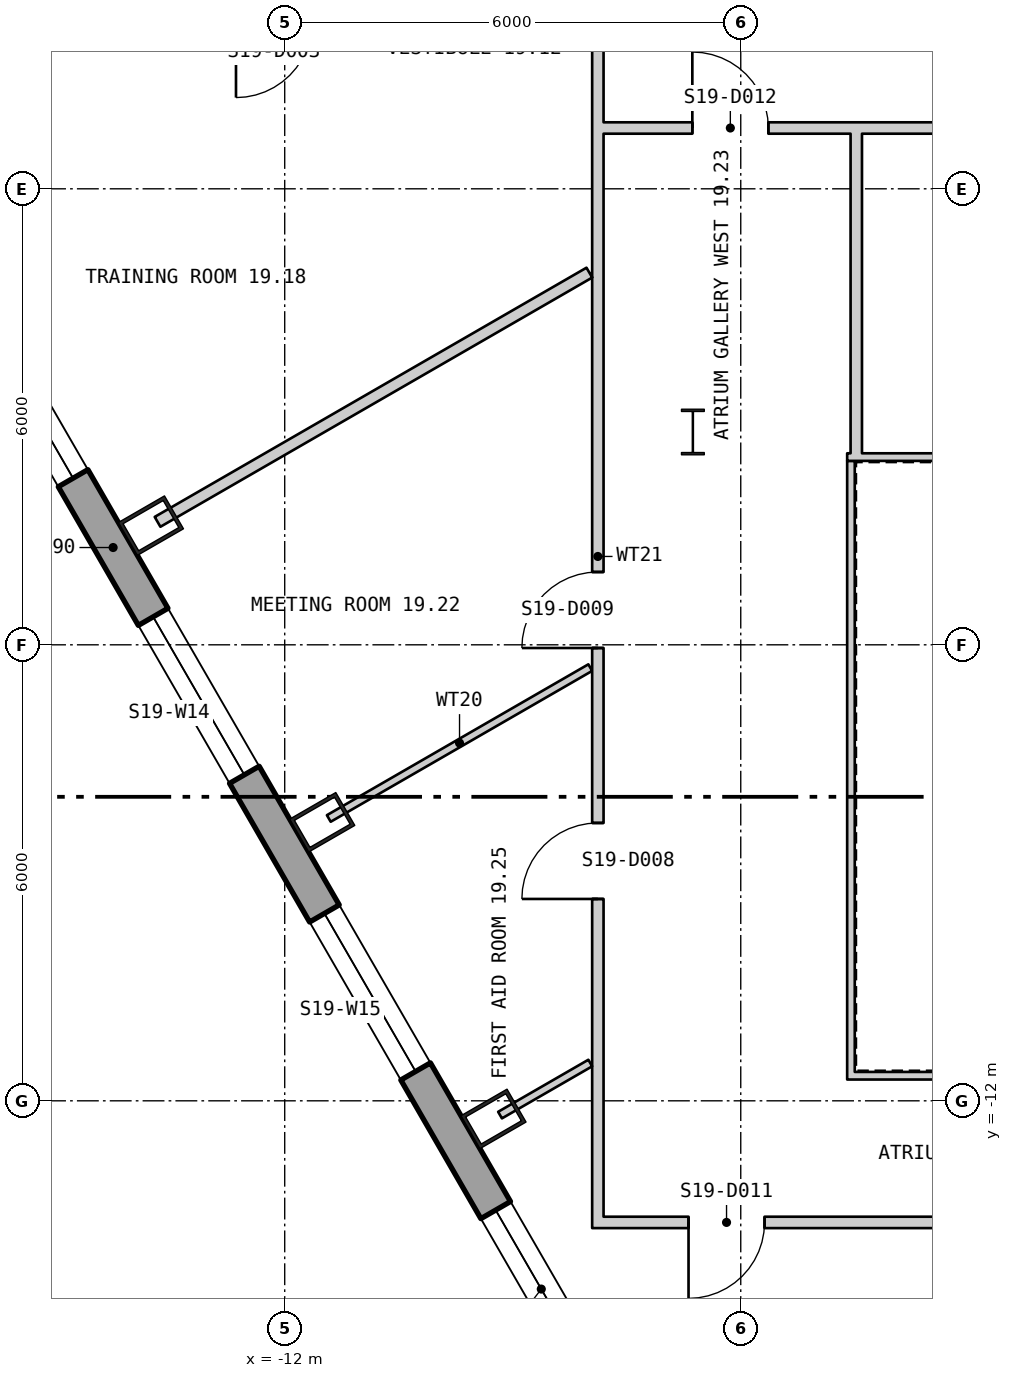
"""IFC4 building model, lengths in metres.
Left out: names, types, materials, properties, quantities, classifications, styles, units other than length and angle.
Written with IfcOpenShell. Run it as: python <this file> out.ifc"""

import sys

from ifc_helpers import new_model, si_unit, direction, frame, frame_2d, origin, origin_2d, place, context, subcontext, project, spatial, polyline, rectangle, hollow_rectangle, i_section, outline, extrude, element, fill, save


model = new_model("IFC4")
c1 = context("Model", 3, precision=1e-05, world=origin(), true_north=direction((0.0, 1.0)))
c2 = subcontext(c1, "Body", "Model", "MODEL_VIEW")
j1 = project(units=[si_unit("LENGTHUNIT", "METRE"), si_unit("PLANEANGLEUNIT", "RADIAN")], contexts=[c1])
p1 = place(None, origin())
s1 = spatial("IfcSite", under=j1, at=p1, CompositionType="ELEMENT")
p2 = place(p1, origin())
s2 = spatial("IfcBuilding", under=s1, at=p2, CompositionType="ELEMENT")
p3 = place(p2, frame((0.0, 0.0, 257.1)))
s3 = spatial("IfcBuildingStorey", under=s2, at=p3, CompositionType="ELEMENT", Elevation=257.1)
for number, where, z_axis, x_axis in (
    (1, (-13.76, -4.432, 0.0), (0.0, 0.0, 1.0), (0.5, -0.866, 0.0)),
    (2, (-11.506, -8.335, 0.0), (0.0, 0.0, 1.0), (0.5, -0.866, 0.0)),
    (3, (-9.253, -12.238, 0.0), (0.0, 0.0, 1.0), (0.5, -0.866, 0.0)),
):
    element("IfcColumn", number, at=place(p3, frame(where, z_axis=z_axis, x_axis=x_axis)), inside=s3, PredefinedType="COLUMN", context=c2, shape_type="SweptSolid", body=[
        extrude(hollow_rectangle(XDim=0.5, YDim=0.7, WallThickness=0.045, at=origin_2d()), origin(), (0.0, 0.0, 1.0), 3.9),
    ])
p4 = place(p3, frame((-6.63, -3.2, 0.0), z_axis=(0.0, 0.0, 1.0), x_axis=(1.0, 0.0, 0.0)))
e4 = element("IfcColumn", 4, at=p4, inside=s3, PredefinedType="COLUMN", context=c2, shape_type="SweptSolid", body=[
    extrude(i_section(OverallWidth=0.3, OverallDepth=0.6, WebThickness=0.015, FlangeThickness=0.03, at=origin_2d()), origin(), (0.0, 0.0, 1.0), 3.9),
])
p5 = place(p3, frame((-25.69, 15.082, -0.18), z_axis=(0.0, 0.0, 1.0), x_axis=(0.500000141277, -0.866025322218, 0.0)))
e5 = element("IfcWall", 5, at=p5, inside=s3, PredefinedType="SOLIDWALL", context=c2, shape_type="SweptSolid", body=[
    extrude(outline(polyline([(-0.13, -0.225), (45.86, -0.225), (45.6, 0.225), (0.13, 0.225), (-0.13, -0.225)])), origin(), (0.0, 0.0, 1.0), 3.68),
])
p6 = place(p5, frame((1.424, 0.0, 1.08)))
e6 = element("IfcOpeningElement", 6, at=p6, cuts=e5, PredefinedType="OPENING", context=c2, shape_type="SweptSolid", body=[
    extrude(rectangle(XDim=2.4, YDim=2.0, at=frame_2d((1.2, 1.0))), frame((0.0, 0.235, 0.0), z_axis=(0.0, -1.0, 0.0), x_axis=(1.0, 0.0, 0.0)), (0.0, 0.0, 1.0), 0.47),
])
p7 = place(p5, frame((5.892, 0.0, 1.08)))
e7 = element("IfcOpeningElement", 7, at=p7, cuts=e5, PredefinedType="OPENING", context=c2, shape_type="SweptSolid", body=[
    extrude(rectangle(XDim=2.4, YDim=2.0, at=frame_2d((1.2, 1.0))), frame((0.0, 0.235, 0.0), z_axis=(0.0, -1.0, 0.0), x_axis=(1.0, 0.0, 0.0)), (0.0, 0.0, 1.0), 0.47),
])
p8 = place(p5, frame((10.399, 0.0, 1.08)))
e8 = element("IfcOpeningElement", 8, at=p8, cuts=e5, PredefinedType="OPENING", context=c2, shape_type="SweptSolid", body=[
    extrude(rectangle(XDim=2.4, YDim=2.0, at=frame_2d((1.2, 1.0))), frame((0.0, 0.235, 0.0), z_axis=(0.0, -1.0, 0.0), x_axis=(1.0, 0.0, 0.0)), (0.0, 0.0, 1.0), 0.47),
])
p9 = place(p5, frame((14.905, 0.0, 1.08)))
e9 = element("IfcOpeningElement", 9, at=p9, cuts=e5, PredefinedType="OPENING", context=c2, shape_type="SweptSolid", body=[
    extrude(rectangle(XDim=2.4, YDim=2.0, at=frame_2d((1.2, 1.0))), frame((0.0, 0.235, 0.0), z_axis=(0.0, -1.0, 0.0), x_axis=(1.0, 0.0, 0.0)), (0.0, 0.0, 1.0), 0.47),
])
p10 = place(p5, frame((19.412, 0.0, 1.08)))
e10 = element("IfcOpeningElement", 10, at=p10, cuts=e5, PredefinedType="OPENING", context=c2, shape_type="SweptSolid", body=[
    extrude(rectangle(XDim=2.4, YDim=2.0, at=frame_2d((1.2, 1.0))), frame((0.0, 0.235, 0.0), z_axis=(0.0, -1.0, 0.0), x_axis=(1.0, 0.0, 0.0)), (0.0, 0.0, 1.0), 0.47),
])
p11 = place(p5, frame((23.918, 0.0, 1.08)))
e11 = element("IfcOpeningElement", 11, at=p11, cuts=e5, PredefinedType="OPENING", context=c2, shape_type="SweptSolid", body=[
    extrude(rectangle(XDim=2.4, YDim=2.0, at=frame_2d((1.2, 1.0))), frame((0.0, 0.235, 0.0), z_axis=(0.0, -1.0, 0.0), x_axis=(1.0, 0.0, 0.0)), (0.0, 0.0, 1.0), 0.47),
])
p12 = place(p5, frame((28.425, 0.0, 1.08)))
e12 = element("IfcOpeningElement", 12, at=p12, cuts=e5, PredefinedType="OPENING", context=c2, shape_type="SweptSolid", body=[
    extrude(rectangle(XDim=2.4, YDim=2.0, at=frame_2d((1.2, 1.0))), frame((0.0, 0.235, 0.0), z_axis=(0.0, -1.0, 0.0), x_axis=(1.0, 0.0, 0.0)), (0.0, 0.0, 1.0), 0.47),
])
p13 = place(p5, frame((32.932, 0.0, 1.08)))
e13 = element("IfcOpeningElement", 13, at=p13, cuts=e5, PredefinedType="OPENING", context=c2, shape_type="SweptSolid", body=[
    extrude(rectangle(XDim=2.4, YDim=2.0, at=frame_2d((1.2, 1.0))), frame((0.0, 0.235, 0.0), z_axis=(0.0, -1.0, 0.0), x_axis=(1.0, 0.0, 0.0)), (0.0, 0.0, 1.0), 0.47),
])
p14 = place(p5, frame((37.438, 0.0, 1.08)))
e14 = element("IfcOpeningElement", 14, at=p14, cuts=e5, PredefinedType="OPENING", context=c2, shape_type="SweptSolid", body=[
    extrude(rectangle(XDim=2.4, YDim=2.0, at=frame_2d((1.2, 1.0))), frame((0.0, 0.235, 0.0), z_axis=(0.0, -1.0, 0.0), x_axis=(1.0, 0.0, 0.0)), (0.0, 0.0, 1.0), 0.47),
])
p15 = place(p5, frame((41.907, 0.0, 1.08)))
e15 = element("IfcOpeningElement", 15, at=p15, cuts=e5, PredefinedType="OPENING", context=c2, shape_type="SweptSolid", body=[
    extrude(rectangle(XDim=2.4, YDim=2.0, at=frame_2d((1.2, 1.0))), frame((0.0, 0.235, 0.0), z_axis=(0.0, -1.0, 0.0), x_axis=(1.0, 0.0, 0.0)), (0.0, 0.0, 1.0), 0.47),
])
for number, where, z_axis, x_axis in (
    (16, (-4.6, -11.67, 0.0), (0.0, 0.0, 1.0), (1.0, 0.0, 0.0)),
    (17, (4.6, -3.53, 0.0), (0.0, 0.0, 1.0), (-1.0, 0.0, 0.0)),
):
    element("IfcWall", number, at=place(p3, frame(where, z_axis=z_axis, x_axis=x_axis)), inside=s3, PredefinedType="PARTITIONING", context=c2, shape_type="SweptSolid", body=[
        extrude(rectangle(XDim=9.2, YDim=0.1, at=frame_2d((4.6, 0.0))), origin(), (0.0, 0.0, 1.0), 3.7),
    ])
p16 = place(p3, frame((-4.55, -3.58, 0.0), z_axis=(0.0, 0.0, 1.0), x_axis=(0.0, -1.0, 0.0)))
e18 = element("IfcWall", 18, at=p16, inside=s3, PredefinedType="PARTITIONING", context=c2, shape_type="SweptSolid", body=[
    extrude(rectangle(XDim=8.04, YDim=0.1, at=frame_2d((4.02, 0.0))), origin(), (0.0, 0.0, 1.0), 3.7),
])
p17 = place(p3, frame((-13.673, -4.382, 0.0), z_axis=(0.0, 0.0, 1.0), x_axis=(0.866086584464, 0.499894016979, 0.0)))
e19 = element("IfcWall", 19, at=p17, inside=s3, PredefinedType="PARTITIONING", context=c2, shape_type="SweptSolid", body=[
    extrude(rectangle(XDim=6.559, YDim=0.15, at=frame_2d((3.28, 0.0))), origin(), (0.0, 0.0, 1.0), 3.7),
])
p18 = place(p3, frame((-11.42, -8.285, 0.0), z_axis=(0.0, 0.0, 1.0), x_axis=(0.866143665252, 0.499795109164, 0.0)))
e20 = element("IfcWall", 20, at=p18, inside=s3, PredefinedType="PARTITIONING", context=c2, shape_type="SweptSolid", body=[
    extrude(rectangle(XDim=3.972, YDim=0.1, at=frame_2d((1.986, 0.0))), origin(), (0.0, 0.0, 1.0), 3.7),
])
p19 = place(p3, frame((-9.167, -12.188, 0.0), z_axis=(0.0, 0.0, 1.0), x_axis=(0.866124840845, 0.499827730395, 0.0)))
e21 = element("IfcWall", 21, at=p19, inside=s3, PredefinedType="PARTITIONING", context=c2, shape_type="SweptSolid", body=[
    extrude(rectangle(XDim=1.371, YDim=0.1, at=frame_2d((0.685, 0.0))), origin(), (0.0, 0.0, 1.0), 3.7),
])
p20 = place(p3, frame((-7.88, -13.675, 0.0), z_axis=(0.0, 0.0, 1.0), x_axis=(0.0, 1.0, 0.0)))
e22 = element("IfcWall", 22, at=p20, inside=s3, PredefinedType="PARTITIONING", context=c2, shape_type="SweptSolid", body=[
    extrude(rectangle(XDim=17.675, YDim=0.15, at=frame_2d((8.838, 0.0))), origin(), (0.0, 0.0, 1.0), 3.7),
])
p21 = place(p20, frame((4.331, 0.0, 0.0)))
e23 = element("IfcOpeningElement", 23, at=p21, cuts=e22, PredefinedType="OPENING", context=c2, shape_type="SweptSolid", body=[
    extrude(rectangle(XDim=1.0, YDim=2.1, at=frame_2d((0.5, 1.05))), frame((0.0, 0.085, 0.0), z_axis=(0.0, -1.0, 0.0), x_axis=(1.0, 0.0, 0.0)), (0.0, 0.0, 1.0), 0.17),
])
p22 = place(p20, frame((7.633, 0.0, 0.0)))
e24 = element("IfcOpeningElement", 24, at=p22, cuts=e22, PredefinedType="OPENING", context=c2, shape_type="SweptSolid", body=[
    extrude(rectangle(XDim=1.0, YDim=2.1, at=frame_2d((0.5, 1.05))), frame((0.0, 0.085, 0.0), z_axis=(0.0, -1.0, 0.0), x_axis=(1.0, 0.0, 0.0)), (0.0, 0.0, 1.0), 0.17),
])
p23 = place(p20, frame((16.275, 0.0, 0.0)))
e25 = element("IfcOpeningElement", 25, at=p23, cuts=e22, PredefinedType="OPENING", context=c2, shape_type="SweptSolid", body=[
    extrude(rectangle(XDim=1.0, YDim=2.1, at=frame_2d((0.5, 1.05))), frame((0.0, 0.085, 0.0), z_axis=(0.0, -1.0, 0.0), x_axis=(1.0, 0.0, 0.0)), (0.0, 0.0, 1.0), 0.17),
])
p24 = place(p3, frame((-7.805, -13.6, 0.0), z_axis=(0.0, 0.0, 1.0), x_axis=(1.0, 0.0, 0.0)))
e26 = element("IfcWall", 26, at=p24, inside=s3, PredefinedType="PARTITIONING", context=c2, shape_type="SweptSolid", body=[
    extrude(rectangle(XDim=6.105, YDim=0.15, at=frame_2d((3.053, 0.0))), origin(), (0.0, 0.0, 1.0), 2.692),
])
p25 = place(p24, frame((1.118, 0.0, 0.0)))
e27 = element("IfcOpeningElement", 27, at=p25, cuts=e26, PredefinedType="OPENING", context=c2, shape_type="SweptSolid", body=[
    extrude(rectangle(XDim=1.0, YDim=2.1, at=frame_2d((0.5, 1.05))), frame((0.0, 0.085, 0.0), z_axis=(0.0, -1.0, 0.0), x_axis=(1.0, 0.0, 0.0)), (0.0, 0.0, 1.0), 0.17),
])
p26 = place(p3, frame((-7.805, 0.8, 0.0), z_axis=(0.0, 0.0, 1.0), x_axis=(1.0, 0.0, 0.0)))
e28 = element("IfcWall", 28, at=p26, inside=s3, PredefinedType="PARTITIONING", context=c2, shape_type="SweptSolid", body=[
    extrude(rectangle(XDim=15.61, YDim=0.15, at=frame_2d((7.805, 0.0))), origin(), (0.0, 0.0, 1.0), 3.7),
])
p27 = place(p26, frame((1.168, 0.0, 0.0)))
e29 = element("IfcOpeningElement", 29, at=p27, cuts=e28, PredefinedType="OPENING", context=c2, shape_type="SweptSolid", body=[
    extrude(rectangle(XDim=1.0, YDim=2.1, at=frame_2d((0.5, 1.05))), frame((0.0, 0.085, 0.0), z_axis=(0.0, -1.0, 0.0), x_axis=(1.0, 0.0, 0.0)), (0.0, 0.0, 1.0), 0.17),
])
p28 = place(p26, frame((6.399, 0.0, 0.0)))
e30 = element("IfcOpeningElement", 30, at=p28, cuts=e28, PredefinedType="OPENING", context=c2, shape_type="SweptSolid", body=[
    extrude(rectangle(XDim=1.0, YDim=2.1, at=frame_2d((0.5, 1.05))), frame((0.0, 0.085, 0.0), z_axis=(0.0, -1.0, 0.0), x_axis=(1.0, 0.0, 0.0)), (0.0, 0.0, 1.0), 0.17),
])
p29 = place(p26, frame((8.006, 0.0, 0.0)))
e31 = element("IfcOpeningElement", 31, at=p29, cuts=e28, PredefinedType="OPENING", context=c2, shape_type="SweptSolid", body=[
    extrude(rectangle(XDim=1.0, YDim=2.1, at=frame_2d((0.5, 1.05))), frame((0.0, 0.085, 0.0), z_axis=(0.0, -1.0, 0.0), x_axis=(1.0, 0.0, 0.0)), (0.0, 0.0, 1.0), 0.17),
])
p30 = place(p26, frame((13.441, 0.0, 0.0)))
e32 = element("IfcOpeningElement", 32, at=p30, cuts=e28, PredefinedType="OPENING", context=c2, shape_type="SweptSolid", body=[
    extrude(rectangle(XDim=1.0, YDim=2.1, at=frame_2d((0.5, 1.05))), frame((0.0, 0.085, 0.0), z_axis=(0.0, -1.0, 0.0), x_axis=(1.0, 0.0, 0.0)), (0.0, 0.0, 1.0), 0.17),
])
p31 = place(p3, frame((-4.48, -3.48, 0.0), z_axis=(0.0, 0.0, 1.0), x_axis=(0.0, 1.0, 0.0)))
e33 = element("IfcWall", 33, at=p31, inside=s3, PredefinedType="PARTITIONING", context=c2, shape_type="SweptSolid", body=[
    extrude(rectangle(XDim=4.205, YDim=0.15, at=frame_2d((2.103, 0.0))), origin(), (0.0, 0.0, 1.0), 3.7),
])
p32 = place(p10, origin())
e34 = element("IfcWindow", 34, at=p32, inside=s3, PartitioningType="SINGLE_PANEL", PredefinedType="WINDOW", context=c2, shape_type="SweptSolid", body=[
    extrude(rectangle(XDim=2.4, YDim=2.0, at=frame_2d((1.2, 1.0))), frame((0.0, 0.105, 0.0), z_axis=(0.0, -1.0, 0.0), x_axis=(1.0, 0.0, 0.0)), (0.0, 0.0, 1.0), 0.06),
])
fill(e10, e34)
p33 = place(p11, origin())
e35 = element("IfcWindow", 35, at=p33, inside=s3, PartitioningType="SINGLE_PANEL", PredefinedType="WINDOW", context=c2, shape_type="SweptSolid", body=[
    extrude(rectangle(XDim=2.4, YDim=2.0, at=frame_2d((1.2, 1.0))), frame((0.0, 0.105, 0.0), z_axis=(0.0, -1.0, 0.0), x_axis=(1.0, 0.0, 0.0)), (0.0, 0.0, 1.0), 0.06),
])
fill(e11, e35)
p34 = place(p12, origin())
e36 = element("IfcWindow", 36, at=p34, inside=s3, PartitioningType="SINGLE_PANEL", PredefinedType="WINDOW", context=c2, shape_type="SweptSolid", body=[
    extrude(rectangle(XDim=2.4, YDim=2.0, at=frame_2d((1.2, 1.0))), frame((0.0, 0.105, 0.0), z_axis=(0.0, -1.0, 0.0), x_axis=(1.0, 0.0, 0.0)), (0.0, 0.0, 1.0), 0.06),
])
fill(e12, e36)
p35 = place(p13, origin())
e37 = element("IfcWindow", 37, at=p35, inside=s3, PartitioningType="SINGLE_PANEL", PredefinedType="WINDOW", context=c2, shape_type="SweptSolid", body=[
    extrude(rectangle(XDim=2.4, YDim=2.0, at=frame_2d((1.2, 1.0))), frame((0.0, 0.105, 0.0), z_axis=(0.0, -1.0, 0.0), x_axis=(1.0, 0.0, 0.0)), (0.0, 0.0, 1.0), 0.06),
])
fill(e13, e37)
p36 = place(p21, origin())
e38 = element("IfcDoor", 38, at=p36, inside=s3, OperationType="SINGLE_SWING_RIGHT", PredefinedType="DOOR", context=c2, shape_type="SweptSolid", body=[
    extrude(rectangle(XDim=1.0, YDim=2.1, at=frame_2d((0.5, 1.05))), frame((0.0, 0.025, 0.0), z_axis=(0.0, -1.0, 0.0), x_axis=(1.0, 0.0, 0.0)), (0.0, 0.0, 1.0), 0.05),
])
fill(e23, e38)
p37 = place(p22, origin())
e39 = element("IfcDoor", 39, at=p37, inside=s3, OperationType="SINGLE_SWING_RIGHT", PredefinedType="DOOR", context=c2, shape_type="SweptSolid", body=[
    extrude(rectangle(XDim=1.0, YDim=2.1, at=frame_2d((0.5, 1.05))), frame((0.0, 0.025, 0.0), z_axis=(0.0, -1.0, 0.0), x_axis=(1.0, 0.0, 0.0)), (0.0, 0.0, 1.0), 0.05),
])
fill(e24, e39)
p38 = place(p25, origin())
e40 = element("IfcDoor", 40, at=p38, inside=s3, OperationType="SINGLE_SWING_LEFT", PredefinedType="DOOR", context=c2, shape_type="SweptSolid", body=[
    extrude(rectangle(XDim=1.0, YDim=2.1, at=frame_2d((0.5, 1.05))), frame((0.0, 0.025, 0.0), z_axis=(0.0, -1.0, 0.0), x_axis=(1.0, 0.0, 0.0)), (0.0, 0.0, 1.0), 0.05),
])
fill(e27, e40)
p39 = place(p27, origin())
e41 = element("IfcDoor", 41, at=p39, inside=s3, OperationType="SINGLE_SWING_RIGHT", PredefinedType="DOOR", context=c2, shape_type="SweptSolid", body=[
    extrude(rectangle(XDim=1.0, YDim=2.1, at=frame_2d((0.5, 1.05))), frame((0.0, 0.025, 0.0), z_axis=(0.0, -1.0, 0.0), x_axis=(1.0, 0.0, 0.0)), (0.0, 0.0, 1.0), 0.05),
])
fill(e29, e41)
save(model, sys.argv[1])
